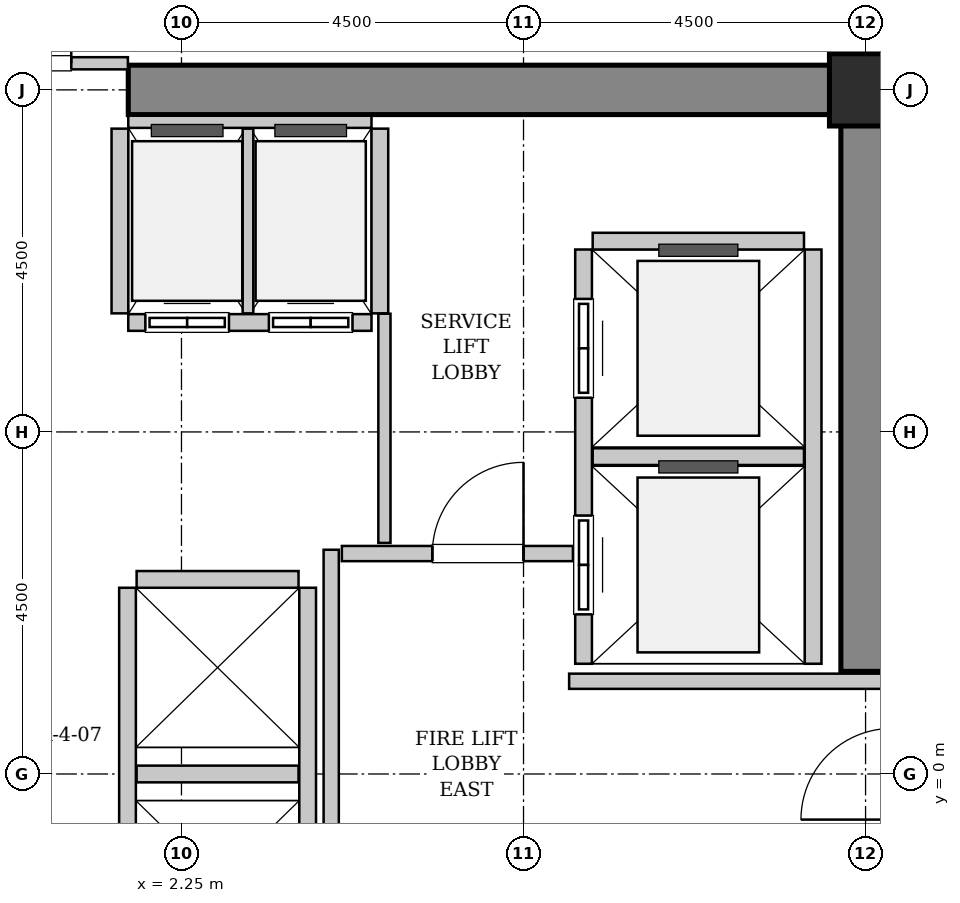
"""IFC4 building model, lengths in metres.
Left out: names, types, materials, properties, quantities, classifications, styles, units other than length and angle.
Written with IfcOpenShell. Run it as: python <this file> out.ifc"""

import sys

from ifc_helpers import new_model, si_unit, direction, frame, frame_2d, origin, origin_2d, place, context, subcontext, project, spatial, rectangle, hollow_rectangle, extrude, source, transform, mapped, element, fill, save


model = new_model("IFC4")
c1 = context("Model", 3, precision=1e-05, world=origin(), true_north=direction((0.0, 1.0)))
c2 = subcontext(c1, "Body", "Model", "MODEL_VIEW")
j1 = project(units=[si_unit("LENGTHUNIT", "METRE"), si_unit("PLANEANGLEUNIT", "RADIAN")], contexts=[c1])
p1 = place(None, origin())
s1 = spatial("IfcSite", under=j1, at=p1, CompositionType="ELEMENT")
p2 = place(p1, origin())
s2 = spatial("IfcBuilding", under=s1, at=p2, CompositionType="ELEMENT")
p3 = place(p2, frame((0.0, 0.0, 71.0)))
s3 = spatial("IfcBuildingStorey", under=s2, at=p3, CompositionType="ELEMENT", Elevation=71.0)
m1 = source(origin(), c2, "Body", "SweptSolid", [
    extrude(rectangle(XDim=10.025, YDim=0.65, at=frame_2d((5.012, 0.0))), origin(), (0.0, 0.0, 1.0), 3.8),
])
p4 = place(p3, frame((1.55, 9.0, 0.0), z_axis=(0.0, 0.0, 1.0), x_axis=(1.0, 0.0, 0.0)))
e1 = element("IfcWall", 1, at=p4, inside=s3, PredefinedType="SHEAR", context=c2, shape_type="MappedRepresentation", body=[
    mapped(m1, transform((0.0, 0.0, 0.0), x_axis=(1.0, 0.0, 0.0), y_axis=(0.0, 1.0, 0.0), z_axis=(0.0, 0.0, 1.0), scale=1.0)),
])
m2 = source(origin(), c2, "Body", "SweptSolid", [
    extrude(rectangle(XDim=7.325, YDim=0.65, at=frame_2d((3.663, 0.0))), origin(), (0.0, 0.0, 1.0), 3.8),
])
p5 = place(p3, frame((11.25, 1.35, 0.0), z_axis=(0.0, 0.0, 1.0), x_axis=(0.0, 1.0, 0.0)))
e2 = element("IfcWall", 2, at=p5, inside=s3, PredefinedType="SHEAR", context=c2, shape_type="MappedRepresentation", body=[
    mapped(m2, transform((0.0, 0.0, 0.0), x_axis=(1.0, 0.0, 0.0), y_axis=(0.0, 1.0, 0.0), z_axis=(0.0, 0.0, 1.0), scale=1.0)),
])
m3 = source(origin(), c2, "Body", "SweptSolid", [
    extrude(hollow_rectangle(XDim=0.95, YDim=0.95, WallThickness=0.045, InnerFilletRadius=0.045, OuterFilletRadius=0.09, at=origin_2d()), origin(), (0.0, 0.0, 1.0), 3.8),
])
p6 = place(p3, frame((11.25, 9.0, 0.0), z_axis=(0.0, 0.0, 1.0), x_axis=(1.0, 0.0, 0.0)))
e3 = element("IfcColumn", 3, at=p6, inside=s3, PredefinedType="COLUMN", context=c2, shape_type="MappedRepresentation", body=[
    mapped(m3, transform((0.0, 0.0, 0.0), x_axis=(1.0, 0.0, 0.0), y_axis=(0.0, 1.0, 0.0), z_axis=(0.0, 0.0, 1.0), scale=1.0)),
])
m4 = source(origin(), c2, "Body", "SweptSolid", [
    extrude(rectangle(XDim=5.45, YDim=0.22, at=frame_2d((2.725, 0.0))), origin(), (0.0, 0.0, 1.0), 3.535),
])
p7 = place(p3, frame((7.54, 6.9, 0.0), z_axis=(0.0, 0.0, 1.0), x_axis=(0.0, -1.0, 0.0)))
e4 = element("IfcWall", 4, at=p7, inside=s3, PredefinedType="SOLIDWALL", context=c2, shape_type="MappedRepresentation", body=[
    mapped(m4, transform((0.0, 0.0, 0.0), x_axis=(1.0, 0.0, 0.0), y_axis=(0.0, 1.0, 0.0), z_axis=(0.0, 0.0, 1.0), scale=1.0)),
])
p8 = place(p7, frame((3.5, 0.0, 0.0)))
e5 = element("IfcOpeningElement", 5, at=p8, cuts=e4, PredefinedType="OPENING", context=c2, shape_type="SweptSolid", body=[
    extrude(rectangle(XDim=1.3, YDim=2.3, at=frame_2d((0.65, 1.15))), frame((0.0, 0.12, 0.0), z_axis=(0.0, -1.0, 0.0), x_axis=(1.0, 0.0, 0.0)), (0.0, 0.0, 1.0), 0.24),
])
p9 = place(p7, frame((0.65, 0.0, 0.0)))
e6 = element("IfcOpeningElement", 6, at=p9, cuts=e4, PredefinedType="OPENING", context=c2, shape_type="SweptSolid", body=[
    extrude(rectangle(XDim=1.3, YDim=2.3, at=frame_2d((0.65, 1.15))), frame((0.0, 0.12, 0.0), z_axis=(0.0, -1.0, 0.0), x_axis=(1.0, 0.0, 0.0)), (0.0, 0.0, 1.0), 0.24),
])
p10 = place(p3, frame((10.56, 1.45, 0.0), z_axis=(0.0, 0.0, 1.0), x_axis=(0.0, 1.0, 0.0)))
e7 = element("IfcWall", 7, at=p10, inside=s3, PredefinedType="SOLIDWALL", context=c2, shape_type="MappedRepresentation", body=[
    mapped(m4, transform((0.0, 0.0, 0.0), x_axis=(1.0, 0.0, 0.0), y_axis=(0.0, 1.0, 0.0), z_axis=(0.0, 0.0, 1.0), scale=1.0)),
])
m5 = source(origin(), c2, "Body", "SweptSolid", [
    extrude(rectangle(XDim=2.78, YDim=0.22, at=frame_2d((1.39, 0.0))), origin(), (0.0, 0.0, 1.0), 3.535),
])
for number, where, z_axis, x_axis in (
    (8, (7.66, 4.175, 0.0), (0.0, 0.0, 1.0), (1.0, 0.0, 0.0)),
    (9, (10.44, 7.01, 0.0), (0.0, 0.0, 1.0), (-1.0, 0.0, 0.0)),
):
    element("IfcWall", number, at=place(p3, frame(where, z_axis=z_axis, x_axis=x_axis)), inside=s3, PredefinedType="SOLIDWALL", context=c2, shape_type="MappedRepresentation", body=[
        mapped(m5, transform((0.0, 0.0, 0.0), x_axis=(1.0, 0.0, 0.0), y_axis=(0.0, 1.0, 0.0), z_axis=(0.0, 0.0, 1.0), scale=1.0)),
    ])
m6 = source(origin(), c2, "Body", "SweptSolid", [
    extrude(rectangle(XDim=3.2, YDim=0.22, at=frame_2d((1.6, 0.0))), origin(), (0.0, 0.0, 1.0), 3.535),
])
p11 = place(p3, frame((1.55, 5.94, 0.0), z_axis=(0.0, 0.0, 1.0), x_axis=(1.0, 0.0, 0.0)))
e10 = element("IfcWall", 10, at=p11, inside=s3, PredefinedType="SOLIDWALL", context=c2, shape_type="MappedRepresentation", body=[
    mapped(m6, transform((0.0, 0.0, 0.0), x_axis=(1.0, 0.0, 0.0), y_axis=(0.0, 1.0, 0.0), z_axis=(0.0, 0.0, 1.0), scale=1.0)),
])
p12 = place(p11, frame((0.225, 0.0, 0.0)))
e11 = element("IfcOpeningElement", 11, at=p12, cuts=e10, PredefinedType="OPENING", context=c2, shape_type="SweptSolid", body=[
    extrude(rectangle(XDim=1.1, YDim=2.2, at=frame_2d((0.55, 1.1))), frame((0.0, 0.12, 0.0), z_axis=(0.0, -1.0, 0.0), x_axis=(1.0, 0.0, 0.0)), (0.0, 0.0, 1.0), 0.24),
])
p13 = place(p11, frame((1.85, 0.0, 0.0)))
e12 = element("IfcOpeningElement", 12, at=p13, cuts=e10, PredefinedType="OPENING", context=c2, shape_type="SweptSolid", body=[
    extrude(rectangle(XDim=1.1, YDim=2.2, at=frame_2d((0.55, 1.1))), frame((0.0, 0.12, 0.0), z_axis=(0.0, -1.0, 0.0), x_axis=(1.0, 0.0, 0.0)), (0.0, 0.0, 1.0), 0.24),
])
m7 = source(origin(), c2, "Body", "SweptSolid", [
    extrude(rectangle(XDim=3.2, YDim=0.16, at=frame_2d((1.6, 0.0))), origin(), (0.0, 0.0, 1.0), 2.425),
])
p14 = place(p3, frame((4.75, 8.58, 0.0), z_axis=(0.0, 0.0, 1.0), x_axis=(-1.0, 0.0, 0.0)))
e13 = element("IfcWall", 13, at=p14, inside=s3, PredefinedType="PARTITIONING", context=c2, shape_type="MappedRepresentation", body=[
    mapped(m7, transform((0.0, 0.0, 0.0), x_axis=(1.0, 0.0, 0.0), y_axis=(0.0, 1.0, 0.0), z_axis=(0.0, 0.0, 1.0), scale=1.0)),
])
m8 = source(origin(), c2, "Body", "SweptSolid", [
    extrude(rectangle(XDim=2.43, YDim=0.22, at=frame_2d((1.215, 0.0))), origin(), (0.0, 0.0, 1.0), 3.535),
])
p15 = place(p3, frame((1.44, 8.49, 0.0), z_axis=(0.0, 0.0, 1.0), x_axis=(0.0, -1.0, 0.0)))
e14 = element("IfcWall", 14, at=p15, inside=s3, PredefinedType="SOLIDWALL", context=c2, shape_type="MappedRepresentation", body=[
    mapped(m8, transform((0.0, 0.0, 0.0), x_axis=(1.0, 0.0, 0.0), y_axis=(0.0, 1.0, 0.0), z_axis=(0.0, 0.0, 1.0), scale=1.0)),
])
m9 = source(origin(), c2, "Body", "SweptSolid", [
    extrude(rectangle(XDim=2.43, YDim=0.14, at=frame_2d((1.215, 0.0))), origin(), (0.0, 0.0, 1.0), 3.535),
])
p16 = place(p3, frame((3.125, 6.06, 0.0), z_axis=(0.0, 0.0, 1.0), x_axis=(0.0, 1.0, 0.0)))
e15 = element("IfcWall", 15, at=p16, inside=s3, PredefinedType="PARTITIONING", context=c2, shape_type="MappedRepresentation", body=[
    mapped(m9, transform((0.0, 0.0, 0.0), x_axis=(1.0, 0.0, 0.0), y_axis=(0.0, 1.0, 0.0), z_axis=(0.0, 0.0, 1.0), scale=1.0)),
])
p17 = place(p3, frame((4.86, 6.06, 0.0), z_axis=(0.0, 0.0, 1.0), x_axis=(0.0, 1.0, 0.0)))
e16 = element("IfcWall", 16, at=p17, inside=s3, PredefinedType="SOLIDWALL", context=c2, shape_type="MappedRepresentation", body=[
    mapped(m8, transform((0.0, 0.0, 0.0), x_axis=(1.0, 0.0, 0.0), y_axis=(0.0, 1.0, 0.0), z_axis=(0.0, 0.0, 1.0), scale=1.0)),
])
m10 = source(origin(), c2, "Body", "SweptSolid", [
    extrude(rectangle(XDim=4.9, YDim=0.22, at=frame_2d((2.45, 0.0))), origin(), (0.0, 0.0, 1.0), 3.535),
])
for number, where, z_axis, x_axis in (
    (17, (1.54, 2.45, 0.0), (0.0, 0.0, 1.0), (0.0, -1.0, 0.0)),
    (18, (3.91, -2.45, 0.0), (0.0, 0.0, 1.0), (0.0, 1.0, 0.0)),
):
    element("IfcWall", number, at=place(p3, frame(where, z_axis=z_axis, x_axis=x_axis)), inside=s3, PredefinedType="SOLIDWALL", context=c2, shape_type="MappedRepresentation", body=[
        mapped(m10, transform((0.0, 0.0, 0.0), x_axis=(1.0, 0.0, 0.0), y_axis=(0.0, 1.0, 0.0), z_axis=(0.0, 0.0, 1.0), scale=1.0)),
    ])
m11 = source(origin(), c2, "Body", "SweptSolid", [
    extrude(rectangle(XDim=2.13, YDim=0.22, at=frame_2d((1.065, 0.0))), origin(), (0.0, 0.0, 1.0), 3.535),
])
for number, where, z_axis, x_axis in (
    (19, (1.66, 0.0, 0.0), (0.0, 0.0, 1.0), (1.0, 0.0, 0.0)),
    (20, (3.79, 2.56, 0.0), (0.0, 0.0, 1.0), (-1.0, 0.0, 0.0)),
):
    element("IfcWall", number, at=place(p3, frame(where, z_axis=z_axis, x_axis=x_axis)), inside=s3, PredefinedType="SOLIDWALL", context=c2, shape_type="MappedRepresentation", body=[
        mapped(m11, transform((0.0, 0.0, 0.0), x_axis=(1.0, 0.0, 0.0), y_axis=(0.0, 1.0, 0.0), z_axis=(0.0, 0.0, 1.0), scale=1.0)),
    ])
m12 = source(origin(), c2, "Body", "SweptSolid", [
    extrude(rectangle(XDim=5.9, YDim=0.2, at=frame_2d((2.95, 0.0))), origin(), (0.0, 0.0, 1.0), 3.535),
])
p18 = place(p3, frame((4.22, -2.95, 0.0), z_axis=(0.0, 0.0, 1.0), x_axis=(0.0, 1.0, 0.0)))
e21 = element("IfcWall", 21, at=p18, inside=s3, PredefinedType="PARTITIONING", context=c2, shape_type="MappedRepresentation", body=[
    mapped(m12, transform((0.0, 0.0, 0.0), x_axis=(1.0, 0.0, 0.0), y_axis=(0.0, 1.0, 0.0), z_axis=(0.0, 0.0, 1.0), scale=1.0)),
])
m13 = source(origin(), c2, "Body", "SweptSolid", [
    extrude(rectangle(XDim=3.04, YDim=0.2, at=frame_2d((1.52, 0.0))), origin(), (0.0, 0.0, 1.0), 3.535),
])
p19 = place(p3, frame((4.36, 2.9, 0.0), z_axis=(0.0, 0.0, 1.0), x_axis=(1.0, 0.0, 0.0)))
e22 = element("IfcWall", 22, at=p19, inside=s3, PredefinedType="PARTITIONING", context=c2, shape_type="MappedRepresentation", body=[
    mapped(m13, transform((0.0, 0.0, 0.0), x_axis=(1.0, 0.0, 0.0), y_axis=(0.0, 1.0, 0.0), z_axis=(0.0, 0.0, 1.0), scale=1.0)),
])
p20 = place(p19, frame((1.19, 0.0, 0.0)))
e23 = element("IfcOpeningElement", 23, at=p20, cuts=e22, PredefinedType="OPENING", context=c2, shape_type="SweptSolid", body=[
    extrude(rectangle(XDim=1.2, YDim=2.15, at=frame_2d((0.6, 1.075))), frame((0.0, 0.11, 0.0), z_axis=(0.0, -1.0, 0.0), x_axis=(1.0, 0.0, 0.0)), (0.0, 0.0, 1.0), 0.22),
])
m14 = source(origin(), c2, "Body", "SweptSolid", [
    extrude(rectangle(XDim=4.11, YDim=0.2, at=frame_2d((2.055, 0.0))), origin(), (0.0, 0.0, 1.0), 3.535),
])
p21 = place(p3, frame((7.35, 1.22, 0.0), z_axis=(0.0, 0.0, 1.0), x_axis=(1.0, 0.0, 0.0)))
e24 = element("IfcWall", 24, at=p21, inside=s3, PredefinedType="PARTITIONING", context=c2, shape_type="MappedRepresentation", body=[
    mapped(m14, transform((0.0, 0.0, 0.0), x_axis=(1.0, 0.0, 0.0), y_axis=(0.0, 1.0, 0.0), z_axis=(0.0, 0.0, 1.0), scale=1.0)),
])
m15 = source(origin(), c2, "Body", "SweptSolid", [
    extrude(rectangle(XDim=3.09, YDim=0.16, at=frame_2d((1.545, 0.0))), origin(), (0.0, 0.0, 1.0), 2.425),
])
p22 = place(p3, frame((-1.545, 9.35, 0.0), z_axis=(0.0, 0.0, 1.0), x_axis=(1.0, 0.0, 0.0)))
e25 = element("IfcWall", 25, at=p22, inside=s3, PredefinedType="PARTITIONING", context=c2, shape_type="MappedRepresentation", body=[
    mapped(m15, transform((0.0, 0.0, 0.0), x_axis=(1.0, 0.0, 0.0), y_axis=(0.0, 1.0, 0.0), z_axis=(0.0, 0.0, 1.0), scale=1.0)),
])
p23 = place(p22, frame((0.745, 0.0, 0.0)))
e26 = element("IfcOpeningElement", 26, at=p23, cuts=e25, PredefinedType="OPENING", context=c2, shape_type="SweptSolid", body=[
    extrude(rectangle(XDim=1.6, YDim=2.3, at=frame_2d((0.8, 1.15))), frame((0.0, 0.09, 0.0), z_axis=(0.0, -1.0, 0.0), x_axis=(1.0, 0.0, 0.0)), (0.0, 0.0, 1.0), 0.18),
])
m16 = source(origin(), c2, "Body", "SweptSolid", [
    extrude(rectangle(XDim=3.015, YDim=0.16, at=frame_2d((1.507, 0.0))), origin(), (0.0, 0.0, 1.0), 3.535),
])
p24 = place(p3, frame((4.92, 3.04, 0.0), z_axis=(0.0, 0.0, 1.0), x_axis=(0.0, 1.0, 0.0)))
e27 = element("IfcWall", 27, at=p24, inside=s3, PredefinedType="PARTITIONING", context=c2, shape_type="MappedRepresentation", body=[
    mapped(m16, transform((0.0, 0.0, 0.0), x_axis=(1.0, 0.0, 0.0), y_axis=(0.0, 1.0, 0.0), z_axis=(0.0, 0.0, 1.0), scale=1.0)),
])
m17 = source(origin(), c2, "Body", "SweptSolid", [
    extrude(rectangle(XDim=1.3, YDim=2.3, at=frame_2d((0.65, 1.15))), frame((0.0, 0.025, 0.0), z_axis=(0.0, -1.0, 0.0), x_axis=(1.0, 0.0, 0.0)), (0.0, 0.0, 1.0), 0.05),
])
p25 = place(p8, origin())
e28 = element("IfcDoor", 28, at=p25, inside=s3, OperationType="SLIDING_TO_RIGHT", PredefinedType="DOOR", context=c2, shape_type="MappedRepresentation", body=[
    mapped(m17, transform((0.0, 0.0, 0.0), x_axis=(1.0, 0.0, 0.0), y_axis=(0.0, 1.0, 0.0), z_axis=(0.0, 0.0, 1.0), scale=1.0)),
])
fill(e5, e28)
p26 = place(p9, origin())
e29 = element("IfcDoor", 29, at=p26, inside=s3, OperationType="SLIDING_TO_RIGHT", PredefinedType="DOOR", context=c2, shape_type="MappedRepresentation", body=[
    mapped(m17, transform((0.0, 0.0, 0.0), x_axis=(1.0, 0.0, 0.0), y_axis=(0.0, 1.0, 0.0), z_axis=(0.0, 0.0, 1.0), scale=1.0)),
])
fill(e6, e29)
m18 = source(origin(), c2, "Body", "SweptSolid", [
    extrude(rectangle(XDim=1.1, YDim=2.2, at=frame_2d((0.55, 1.1))), frame((0.0, 0.025, 0.0), z_axis=(0.0, -1.0, 0.0), x_axis=(1.0, 0.0, 0.0)), (0.0, 0.0, 1.0), 0.05),
])
p27 = place(p12, origin())
e30 = element("IfcDoor", 30, at=p27, inside=s3, OperationType="DOUBLE_DOOR_SLIDING", PredefinedType="DOOR", context=c2, shape_type="MappedRepresentation", body=[
    mapped(m18, transform((0.0, 0.0, 0.0), x_axis=(1.0, 0.0, 0.0), y_axis=(0.0, 1.0, 0.0), z_axis=(0.0, 0.0, 1.0), scale=1.0)),
])
fill(e11, e30)
p28 = place(p13, origin())
e31 = element("IfcDoor", 31, at=p28, inside=s3, OperationType="DOUBLE_DOOR_SLIDING", PredefinedType="DOOR", context=c2, shape_type="MappedRepresentation", body=[
    mapped(m18, transform((0.0, 0.0, 0.0), x_axis=(1.0, 0.0, 0.0), y_axis=(0.0, 1.0, 0.0), z_axis=(0.0, 0.0, 1.0), scale=1.0)),
])
fill(e12, e31)
m19 = source(origin(), c2, "Body", "SweptSolid", [
    extrude(rectangle(XDim=1.2, YDim=2.15, at=frame_2d((0.6, 1.075))), frame((0.0, 0.025, 0.0), z_axis=(0.0, -1.0, 0.0), x_axis=(1.0, 0.0, 0.0)), (0.0, 0.0, 1.0), 0.05),
])
p29 = place(p20, origin())
e32 = element("IfcDoor", 32, at=p29, inside=s3, OperationType="SINGLE_SWING_RIGHT", PredefinedType="DOOR", context=c2, shape_type="MappedRepresentation", body=[
    mapped(m19, transform((0.0, 0.0, 0.0), x_axis=(1.0, 0.0, 0.0), y_axis=(0.0, 1.0, 0.0), z_axis=(0.0, 0.0, 1.0), scale=1.0)),
])
fill(e23, e32)
m20 = source(origin(), c2, "Body", "SweptSolid", [
    extrude(rectangle(XDim=1.6, YDim=2.3, at=frame_2d((0.8, 1.15))), frame((0.0, 0.025, 0.0), z_axis=(0.0, -1.0, 0.0), x_axis=(1.0, 0.0, 0.0)), (0.0, 0.0, 1.0), 0.05),
])
p30 = place(p23, origin())
e33 = element("IfcDoor", 33, at=p30, inside=s3, OperationType="DOUBLE_DOOR_SINGLE_SWING", PredefinedType="DOOR", context=c2, shape_type="MappedRepresentation", body=[
    mapped(m20, transform((0.0, 0.0, 0.0), x_axis=(1.0, 0.0, 0.0), y_axis=(0.0, 1.0, 0.0), z_axis=(0.0, 0.0, 1.0), scale=1.0)),
])
fill(e26, e33)
save(model, sys.argv[1])
